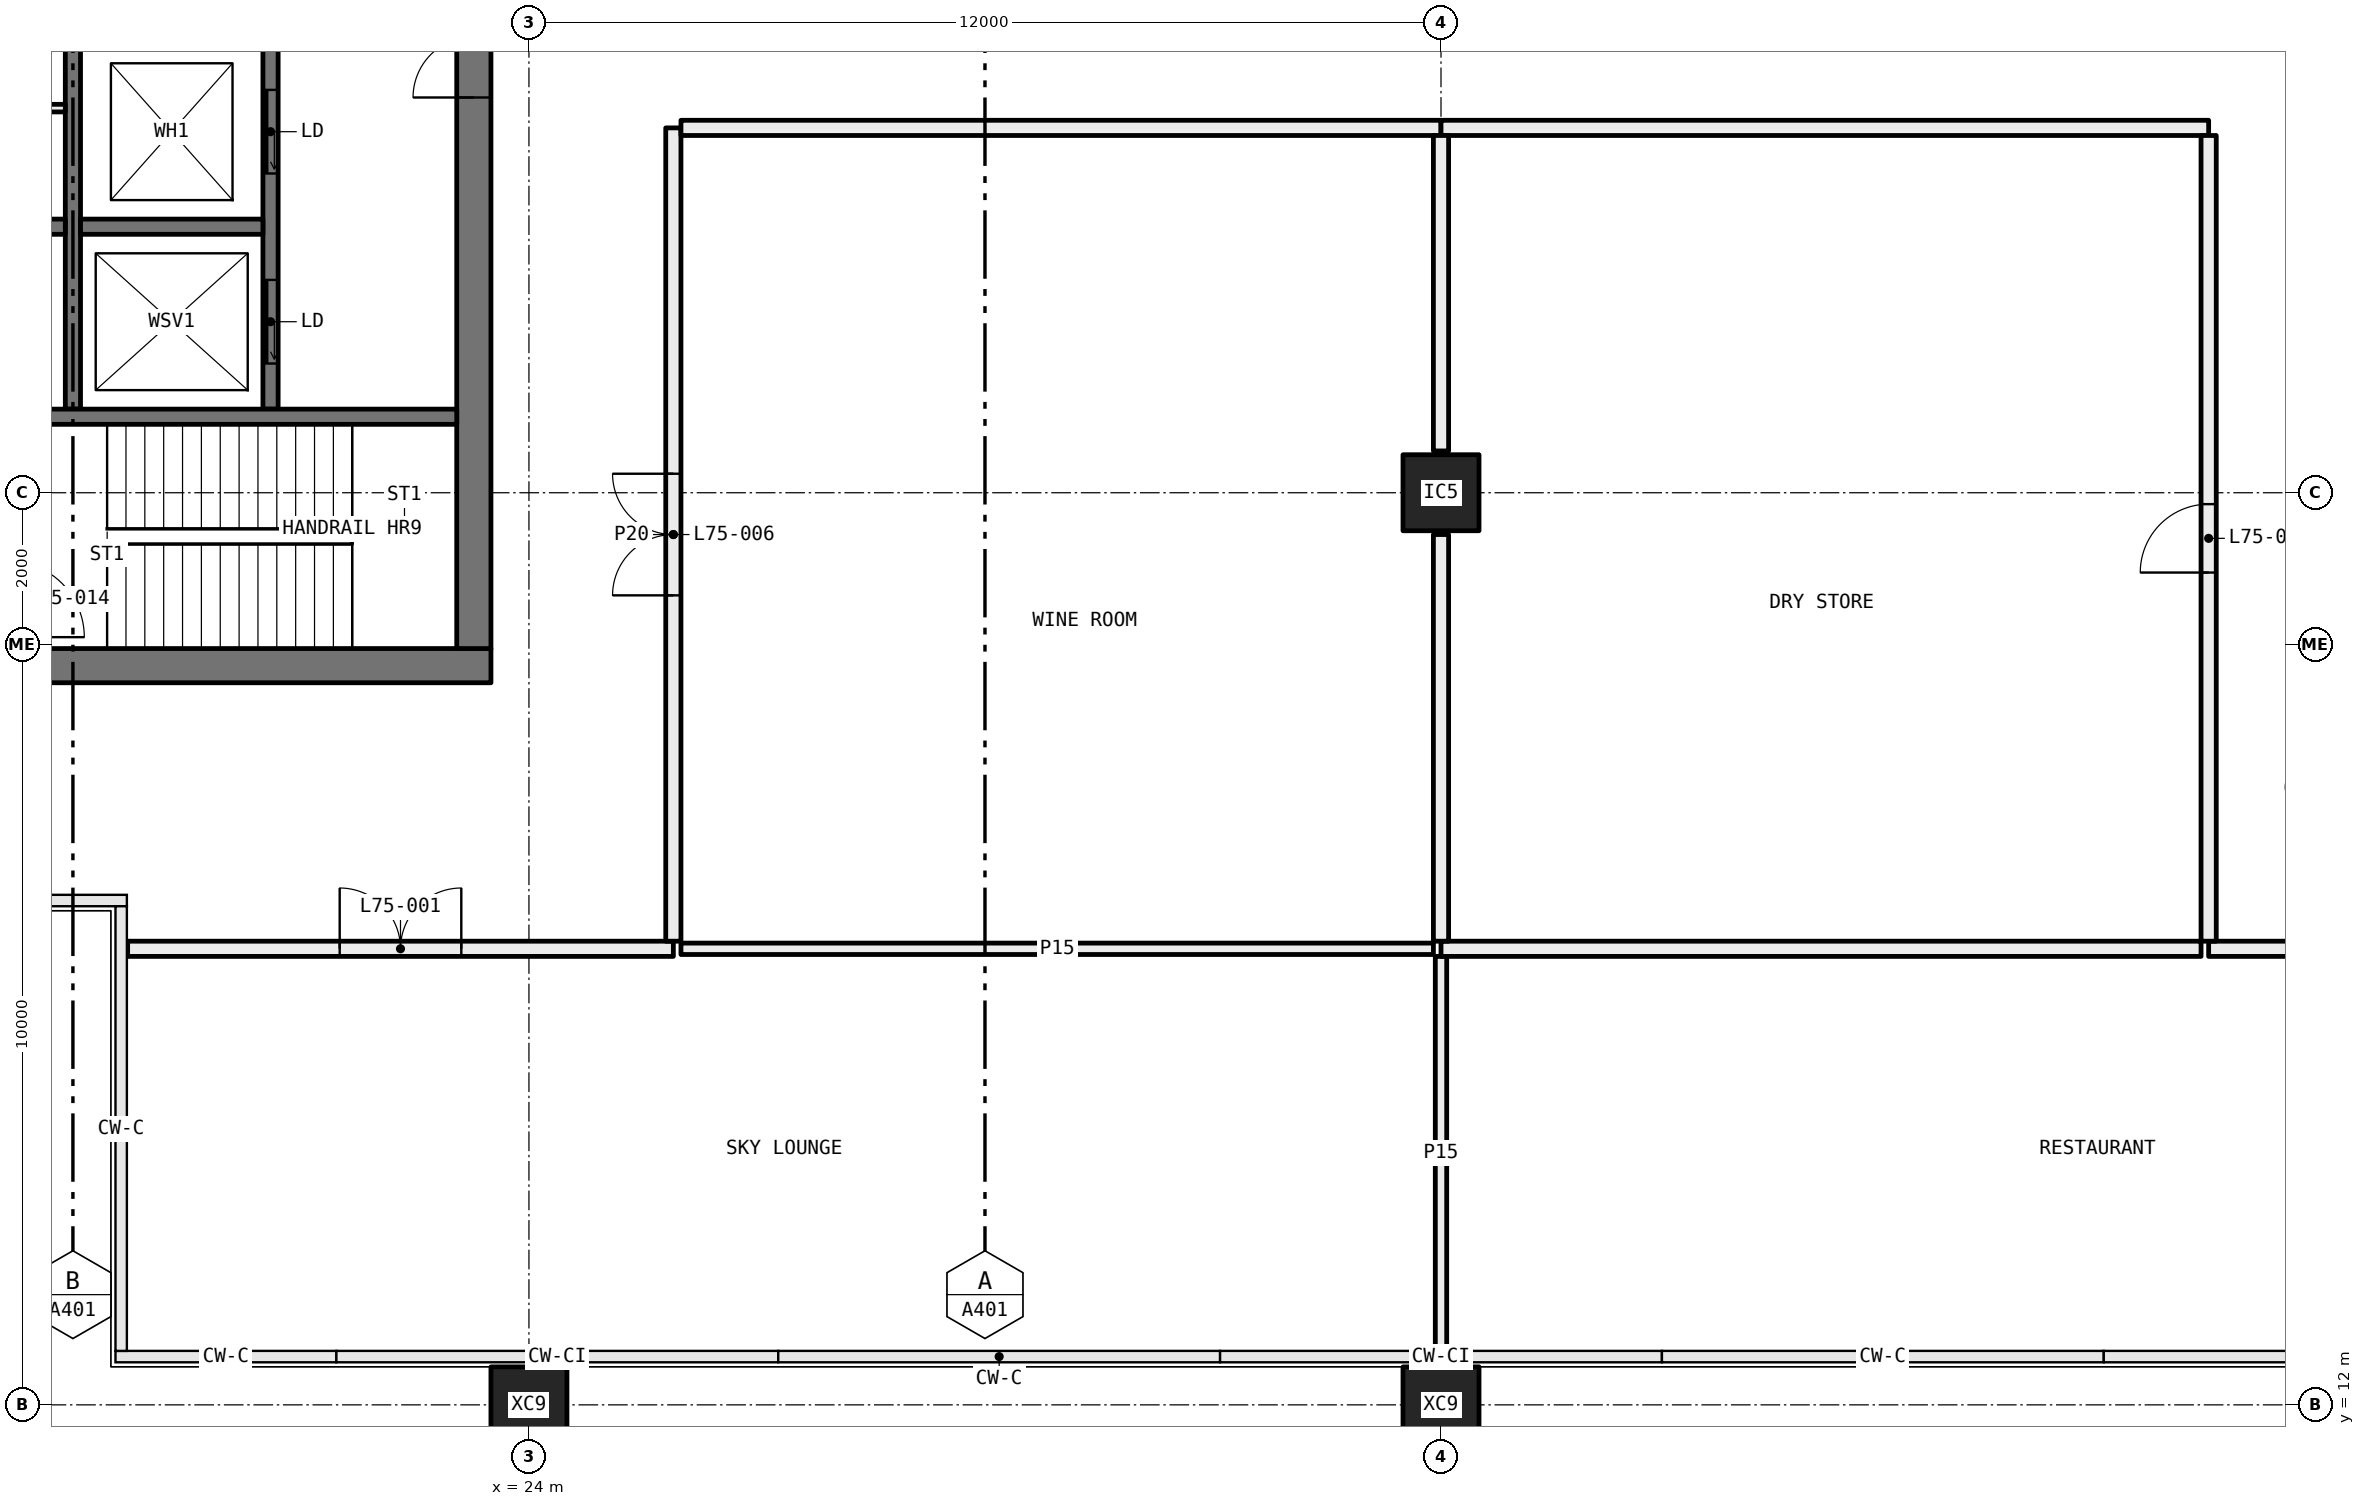
"""IFC4 building model, lengths in metres.
Left out: names, types, materials, properties, quantities, classifications, styles, units other than length and angle.
Written with IfcOpenShell. Run it as: python <this file> out.ifc"""

import sys

from ifc_helpers import new_model, si_unit, direction, frame, frame_2d, origin, origin_2d, place, context, subcontext, project, spatial, rectangle, hollow_rectangle, extrude, element, fill, save


model = new_model("IFC4")
c1 = context("Model", 3, precision=1e-05, world=origin(), true_north=direction((0.0, 1.0)))
c2 = subcontext(c1, "Body", "Model", "MODEL_VIEW")
j1 = project(units=[si_unit("LENGTHUNIT", "METRE"), si_unit("PLANEANGLEUNIT", "RADIAN")], contexts=[c1])
p1 = place(None, origin())
s1 = spatial("IfcSite", under=j1, at=p1, CompositionType="ELEMENT")
p2 = place(p1, origin())
s2 = spatial("IfcBuilding", under=s1, at=p2, CompositionType="ELEMENT")
p3 = place(p2, frame((0.0, 0.0, 277.95)))
s3 = spatial("IfcBuildingStorey", under=s2, at=p3, CompositionType="ELEMENT", Elevation=277.95)
for number, where, z_axis, x_axis in (
    (1, (24.0, 12.0, -0.4), (0.0, 0.0, 1.0), (1.0, 0.0, 0.0)),
    (2, (36.0, 12.0, -0.4), (0.0, 0.0, 1.0), (1.0, 0.0, 0.0)),
):
    element("IfcColumn", number, at=place(p3, frame(where, z_axis=z_axis, x_axis=x_axis)), inside=s3, PredefinedType="COLUMN", context=c2, shape_type="SweptSolid", body=[
        extrude(hollow_rectangle(XDim=1.0, YDim=1.0, WallThickness=0.036, at=origin_2d()), origin(), (0.0, 0.0, 1.0), 5.4),
    ])
p4 = place(p3, frame((36.0, 24.0, 0.0), z_axis=(0.0, 0.0, 1.0), x_axis=(1.0, 0.0, 0.0)))
e3 = element("IfcColumn", 3, at=p4, inside=s3, PredefinedType="COLUMN", context=c2, shape_type="SweptSolid", body=[
    extrude(hollow_rectangle(XDim=1.0, YDim=1.0, WallThickness=0.04, at=origin_2d()), origin(), (0.0, 0.0, 1.0), 5.0),
])
p5 = place(p3, frame((18.72, 18.0, 0.0), z_axis=(0.0, 0.0, 1.0), x_axis=(1.0, 0.0, 0.0)))
e4 = element("IfcWall", 4, at=p5, inside=s3, PredefinedType="PARTITIONING", context=c2, shape_type="SweptSolid", body=[
    extrude(rectangle(XDim=7.18, YDim=0.2, at=frame_2d((3.59, 0.0))), origin(), (0.0, 0.0, 1.0), 5.0),
])
p6 = place(p5, frame((2.79, 0.0, 0.0)))
e5 = element("IfcOpeningElement", 5, at=p6, cuts=e4, PredefinedType="OPENING", context=c2, shape_type="SweptSolid", body=[
    extrude(rectangle(XDim=1.6, YDim=2.1, at=frame_2d((0.8, 1.05))), frame((0.0, 0.11, 0.0), z_axis=(0.0, -1.0, 0.0), x_axis=(1.0, 0.0, 0.0)), (0.0, 0.0, 1.0), 0.22),
])
p7 = place(p3, frame((46.1, 18.0, 0.0), z_axis=(0.0, 0.0, 1.0), x_axis=(1.0, 0.0, 0.0)))
e6 = element("IfcWall", 6, at=p7, inside=s3, PredefinedType="PARTITIONING", context=c2, shape_type="SweptSolid", body=[
    extrude(rectangle(XDim=7.18, YDim=0.2, at=frame_2d((3.59, 0.0))), origin(), (0.0, 0.0, 1.0), 5.0),
])
p8 = place(p7, frame((2.79, 0.0, 0.0)))
e7 = element("IfcOpeningElement", 7, at=p8, cuts=e6, PredefinedType="OPENING", context=c2, shape_type="SweptSolid", body=[
    extrude(rectangle(XDim=1.6, YDim=2.1, at=frame_2d((0.8, 1.05))), frame((0.0, 0.11, 0.0), z_axis=(0.0, -1.0, 0.0), x_axis=(1.0, 0.0, 0.0)), (0.0, 0.0, 1.0), 0.22),
])
p9 = place(p3, frame((25.9, 18.1, 0.0), z_axis=(0.0, 0.0, 1.0), x_axis=(0.0, 1.0, 0.0)))
e8 = element("IfcWall", 8, at=p9, inside=s3, PredefinedType="PARTITIONING", context=c2, shape_type="SweptSolid", body=[
    extrude(rectangle(XDim=10.7, YDim=0.2, at=frame_2d((5.35, 0.0))), origin(), (0.0, 0.0, 1.0), 5.0),
])
p10 = place(p9, frame((4.55, 0.0, 0.0)))
e9 = element("IfcOpeningElement", 9, at=p10, cuts=e8, PredefinedType="OPENING", context=c2, shape_type="SweptSolid", body=[
    extrude(rectangle(XDim=1.6, YDim=2.1, at=frame_2d((0.8, 1.05))), frame((0.0, 0.11, 0.0), z_axis=(0.0, -1.0, 0.0), x_axis=(1.0, 0.0, 0.0)), (0.0, 0.0, 1.0), 0.22),
])
p11 = place(p3, frame((26.0, 28.8, 0.0), z_axis=(0.0, 0.0, 1.0), x_axis=(1.0, 0.0, 0.0)))
e10 = element("IfcWall", 10, at=p11, inside=s3, PredefinedType="PARTITIONING", context=c2, shape_type="SweptSolid", body=[
    extrude(rectangle(XDim=10.0, YDim=0.2, at=frame_2d((5.0, 0.0))), origin(), (0.0, 0.0, 1.0), 4.4),
])
p12 = place(p3, frame((36.0, 28.8, 0.0), z_axis=(0.0, 0.0, 1.0), x_axis=(1.0, 0.0, 0.0)))
e11 = element("IfcWall", 11, at=p12, inside=s3, PredefinedType="PARTITIONING", context=c2, shape_type="SweptSolid", body=[
    extrude(rectangle(XDim=10.1, YDim=0.2, at=frame_2d((5.05, 0.0))), origin(), (0.0, 0.0, 1.0), 4.4),
])
p13 = place(p3, frame((46.1, 28.7, 0.0), z_axis=(0.0, 0.0, 1.0), x_axis=(0.0, -1.0, 0.0)))
e12 = element("IfcWall", 12, at=p13, inside=s3, PredefinedType="PARTITIONING", context=c2, shape_type="SweptSolid", body=[
    extrude(rectangle(XDim=10.6, YDim=0.2, at=frame_2d((5.3, 0.0))), origin(), (0.0, 0.0, 1.0), 5.0),
])
p14 = place(p13, frame((4.85, 0.0, 0.0)))
e13 = element("IfcOpeningElement", 13, at=p14, cuts=e12, PredefinedType="OPENING", context=c2, shape_type="SweptSolid", body=[
    extrude(rectangle(XDim=0.9, YDim=2.1, at=frame_2d((0.45, 1.05))), frame((0.0, 0.11, 0.0), z_axis=(0.0, -1.0, 0.0), x_axis=(1.0, 0.0, 0.0)), (0.0, 0.0, 1.0), 0.22),
])
p15 = place(p3, frame((36.0, 12.72, 0.0), z_axis=(0.0, 0.0, 1.0), x_axis=(0.0, 1.0, 0.0)))
e14 = element("IfcWall", 14, at=p15, inside=s3, PredefinedType="PARTITIONING", context=c2, shape_type="SweptSolid", body=[
    extrude(rectangle(XDim=5.18, YDim=0.15, at=frame_2d((2.59, 0.0))), origin(), (0.0, 0.0, 1.0), 4.1),
])
p16 = place(p3, frame((35.9, 18.0, 0.0), z_axis=(0.0, 0.0, 1.0), x_axis=(-1.0, 0.0, 0.0)))
e15 = element("IfcWall", 15, at=p16, inside=s3, PredefinedType="PARTITIONING", context=c2, shape_type="SweptSolid", body=[
    extrude(rectangle(XDim=9.9, YDim=0.15, at=frame_2d((4.95, 0.0))), origin(), (0.0, 0.0, 1.0), 5.0),
])
p17 = place(p3, frame((46.0, 18.0, 0.0), z_axis=(0.0, 0.0, 1.0), x_axis=(-1.0, 0.0, 0.0)))
e16 = element("IfcWall", 16, at=p17, inside=s3, PredefinedType="PARTITIONING", context=c2, shape_type="SweptSolid", body=[
    extrude(rectangle(XDim=10.0, YDim=0.2, at=frame_2d((5.0, 0.0))), origin(), (0.0, 0.0, 1.0), 5.0),
])
p18 = place(p3, frame((36.0, 18.1, 0.0), z_axis=(0.0, 0.0, 1.0), x_axis=(0.0, 1.0, 0.0)))
e17 = element("IfcWall", 17, at=p18, inside=s3, PredefinedType="PARTITIONING", context=c2, shape_type="SweptSolid", body=[
    extrude(rectangle(XDim=5.35, YDim=0.2, at=frame_2d((2.675, 0.0))), origin(), (0.0, 0.0, 1.0), 4.1),
])
p19 = place(p3, frame((36.0, 24.55, 0.0), z_axis=(0.0, 0.0, 1.0), x_axis=(0.0, 1.0, 0.0)))
e18 = element("IfcWall", 18, at=p19, inside=s3, PredefinedType="PARTITIONING", context=c2, shape_type="SweptSolid", body=[
    extrude(rectangle(XDim=4.15, YDim=0.2, at=frame_2d((2.075, 0.0))), origin(), (0.0, 0.0, 1.0), 4.4),
])
p20 = place(p3, frame((12.5, 21.725, 0.0), z_axis=(0.0, 0.0, 1.0), x_axis=(1.0, 0.0, 0.0)))
e19 = element("IfcWall", 19, at=p20, inside=s3, PredefinedType="SHEAR", context=c2, shape_type="SweptSolid", body=[
    extrude(rectangle(XDim=11.0, YDim=0.45, at=frame_2d((5.5, 0.0))), origin(), (0.0, 0.0, 1.0), 5.0),
])
p21 = place(p20, frame((1.125, 0.0, 0.0)))
e20 = element("IfcOpeningElement", 20, at=p21, cuts=e19, PredefinedType="OPENING", context=c2, shape_type="SweptSolid", body=[
    extrude(rectangle(XDim=1.0, YDim=2.1, at=frame_2d((0.5, 1.05))), frame((0.0, 0.235, 0.0), z_axis=(0.0, -1.0, 0.0), x_axis=(1.0, 0.0, 0.0)), (0.0, 0.0, 1.0), 0.47),
])
p22 = place(p3, frame((23.275, 21.95, 0.0), z_axis=(0.0, 0.0, 1.0), x_axis=(0.0, 1.0, 0.0)))
e21 = element("IfcWall", 21, at=p22, inside=s3, PredefinedType="SHEAR", context=c2, shape_type="SweptSolid", body=[
    extrude(rectangle(XDim=16.1, YDim=0.45, at=frame_2d((8.05, 0.0))), origin(), (0.0, 0.0, 1.0), 5.0),
])
p23 = place(p22, frame((7.25, 0.0, 0.0)))
e22 = element("IfcOpeningElement", 22, at=p23, cuts=e21, PredefinedType="OPENING", context=c2, shape_type="SweptSolid", body=[
    extrude(rectangle(XDim=1.6, YDim=2.1, at=frame_2d((0.8, 1.05))), frame((0.0, 0.235, 0.0), z_axis=(0.0, -1.0, 0.0), x_axis=(1.0, 0.0, 0.0)), (0.0, 0.0, 1.0), 0.47),
])
p24 = place(p3, frame((20.6, 25.1, 0.0), z_axis=(0.0, 0.0, 1.0), x_axis=(0.0, 1.0, 0.0)))
e23 = element("IfcWall", 23, at=p24, inside=s3, PredefinedType="SOLIDWALL", context=c2, shape_type="SweptSolid", body=[
    extrude(rectangle(XDim=12.95, YDim=0.2, at=frame_2d((6.475, 0.0))), origin(), (0.0, 0.0, 1.0), 5.0),
])
p25 = place(p24, frame((0.6, 0.0, 0.0)))
e24 = element("IfcOpeningElement", 24, at=p25, cuts=e23, PredefinedType="OPENING", context=c2, shape_type="SweptSolid", body=[
    extrude(rectangle(XDim=1.1, YDim=2.1, at=frame_2d((0.55, 1.05))), frame((0.0, 0.11, 0.0), z_axis=(0.0, -1.0, 0.0), x_axis=(1.0, 0.0, 0.0)), (0.0, 0.0, 1.0), 0.22),
])
p26 = place(p24, frame((3.1, 0.0, 0.0)))
e25 = element("IfcOpeningElement", 25, at=p26, cuts=e23, PredefinedType="OPENING", context=c2, shape_type="SweptSolid", body=[
    extrude(rectangle(XDim=1.1, YDim=2.1, at=frame_2d((0.55, 1.05))), frame((0.0, 0.11, 0.0), z_axis=(0.0, -1.0, 0.0), x_axis=(1.0, 0.0, 0.0)), (0.0, 0.0, 1.0), 0.22),
])
p27 = place(p24, frame((5.6, 0.0, 0.0)))
e26 = element("IfcOpeningElement", 26, at=p27, cuts=e23, PredefinedType="OPENING", context=c2, shape_type="SweptSolid", body=[
    extrude(rectangle(XDim=1.1, YDim=2.1, at=frame_2d((0.55, 1.05))), frame((0.0, 0.11, 0.0), z_axis=(0.0, -1.0, 0.0), x_axis=(1.0, 0.0, 0.0)), (0.0, 0.0, 1.0), 0.22),
])
p28 = place(p24, frame((8.1, 0.0, 0.0)))
e27 = element("IfcOpeningElement", 27, at=p28, cuts=e23, PredefinedType="OPENING", context=c2, shape_type="SweptSolid", body=[
    extrude(rectangle(XDim=1.1, YDim=2.1, at=frame_2d((0.55, 1.05))), frame((0.0, 0.11, 0.0), z_axis=(0.0, -1.0, 0.0), x_axis=(1.0, 0.0, 0.0)), (0.0, 0.0, 1.0), 0.22),
])
p29 = place(p24, frame((10.975, 0.0, 0.0)))
e28 = element("IfcOpeningElement", 28, at=p29, cuts=e23, PredefinedType="OPENING", context=c2, shape_type="SweptSolid", body=[
    extrude(rectangle(XDim=1.0, YDim=2.1, at=frame_2d((0.5, 1.05))), frame((0.0, 0.11, 0.0), z_axis=(0.0, -1.0, 0.0), x_axis=(1.0, 0.0, 0.0)), (0.0, 0.0, 1.0), 0.22),
])
p30 = place(p3, frame((18.0, 25.1, 0.0), z_axis=(0.0, 0.0, 1.0), x_axis=(0.0, 1.0, 0.0)))
e29 = element("IfcWall", 29, at=p30, inside=s3, PredefinedType="SOLIDWALL", context=c2, shape_type="SweptSolid", body=[
    extrude(rectangle(XDim=9.8, YDim=0.2, at=frame_2d((4.9, 0.0))), origin(), (0.0, 0.0, 1.0), 5.0),
])
p31 = place(p3, frame((15.5, 25.0, 0.0), z_axis=(0.0, 0.0, 1.0), x_axis=(1.0, 0.0, 0.0)))
e30 = element("IfcWall", 30, at=p31, inside=s3, PredefinedType="SOLIDWALL", context=c2, shape_type="SweptSolid", body=[
    extrude(rectangle(XDim=7.55, YDim=0.2, at=frame_2d((3.775, 0.0))), origin(), (0.0, 0.0, 1.0), 5.0),
])
for number, where, z_axis, x_axis in (
    (31, (15.5, 27.5, 0.0), (0.0, 0.0, 1.0), (1.0, 0.0, 0.0)),
    (32, (18.1, 27.5, 0.0), (0.0, 0.0, 1.0), (1.0, 0.0, 0.0)),
):
    element("IfcWall", number, at=place(p3, frame(where, z_axis=z_axis, x_axis=x_axis)), inside=s3, PredefinedType="SOLIDWALL", context=c2, shape_type="SweptSolid", body=[
        extrude(rectangle(XDim=2.4, YDim=0.2, at=frame_2d((1.2, 0.0))), origin(), (0.0, 0.0, 1.0), 5.0),
    ])
p32 = place(p3, frame((15.5, 29.06, 0.0), z_axis=(0.0, 0.0, 1.0), x_axis=(1.0, 0.0, 0.0)))
e33 = element("IfcWall", 33, at=p32, inside=s3, PredefinedType="PARTITIONING", context=c2, shape_type="SweptSolid", body=[
    extrude(rectangle(XDim=2.4, YDim=0.1, at=frame_2d((1.2, 0.0))), origin(), (0.0, 0.0, 1.0), 5.0),
])
p33 = place(p6, origin())
e34 = element("IfcDoor", 34, at=p33, inside=s3, OperationType="DOUBLE_DOOR_SINGLE_SWING", PredefinedType="DOOR", context=c2, shape_type="SweptSolid", body=[
    extrude(rectangle(XDim=1.6, YDim=2.1, at=frame_2d((0.8, 1.05))), frame((0.0, 0.025, 0.0), z_axis=(0.0, -1.0, 0.0), x_axis=(1.0, 0.0, 0.0)), (0.0, 0.0, 1.0), 0.05),
])
fill(e5, e34)
p34 = place(p10, origin())
e35 = element("IfcDoor", 35, at=p34, inside=s3, OperationType="DOUBLE_DOOR_SINGLE_SWING", PredefinedType="DOOR", context=c2, shape_type="SweptSolid", body=[
    extrude(rectangle(XDim=1.6, YDim=2.1, at=frame_2d((0.8, 1.05))), frame((0.0, 0.025, 0.0), z_axis=(0.0, -1.0, 0.0), x_axis=(1.0, 0.0, 0.0)), (0.0, 0.0, 1.0), 0.05),
])
fill(e9, e35)
p35 = place(p14, frame((0.9, 0.0, 0.0), x_axis=(-1.0, 0.0, 0.0)))
e36 = element("IfcDoor", 36, at=p35, inside=s3, OperationType="SINGLE_SWING_RIGHT", PredefinedType="DOOR", context=c2, shape_type="SweptSolid", body=[
    extrude(rectangle(XDim=0.9, YDim=2.1, at=frame_2d((0.45, 1.05))), frame((0.0, 0.025, 0.0), z_axis=(0.0, -1.0, 0.0), x_axis=(1.0, 0.0, 0.0)), (0.0, 0.0, 1.0), 0.05),
])
fill(e13, e36)
p36 = place(p25, origin())
e37 = element("IfcDoor", 37, at=p36, inside=s3, OperationType="SLIDING_TO_LEFT", PredefinedType="DOOR", context=c2, shape_type="SweptSolid", body=[
    extrude(rectangle(XDim=1.1, YDim=2.1, at=frame_2d((0.55, 1.05))), frame((0.0, 0.025, 0.0), z_axis=(0.0, -1.0, 0.0), x_axis=(1.0, 0.0, 0.0)), (0.0, 0.0, 1.0), 0.05),
])
fill(e24, e37)
p37 = place(p26, origin())
e38 = element("IfcDoor", 38, at=p37, inside=s3, OperationType="SLIDING_TO_LEFT", PredefinedType="DOOR", context=c2, shape_type="SweptSolid", body=[
    extrude(rectangle(XDim=1.1, YDim=2.1, at=frame_2d((0.55, 1.05))), frame((0.0, 0.025, 0.0), z_axis=(0.0, -1.0, 0.0), x_axis=(1.0, 0.0, 0.0)), (0.0, 0.0, 1.0), 0.05),
])
fill(e25, e38)
p38 = place(p23, origin())
e39 = element("IfcDoor", 39, at=p38, inside=s3, OperationType="DOUBLE_DOOR_SINGLE_SWING", PredefinedType="DOOR", context=c2, shape_type="SweptSolid", body=[
    extrude(rectangle(XDim=1.6, YDim=2.1, at=frame_2d((0.8, 1.05))), frame((0.0, 0.025, 0.0), z_axis=(0.0, -1.0, 0.0), x_axis=(1.0, 0.0, 0.0)), (0.0, 0.0, 1.0), 0.05),
])
fill(e22, e39)
save(model, sys.argv[1])
